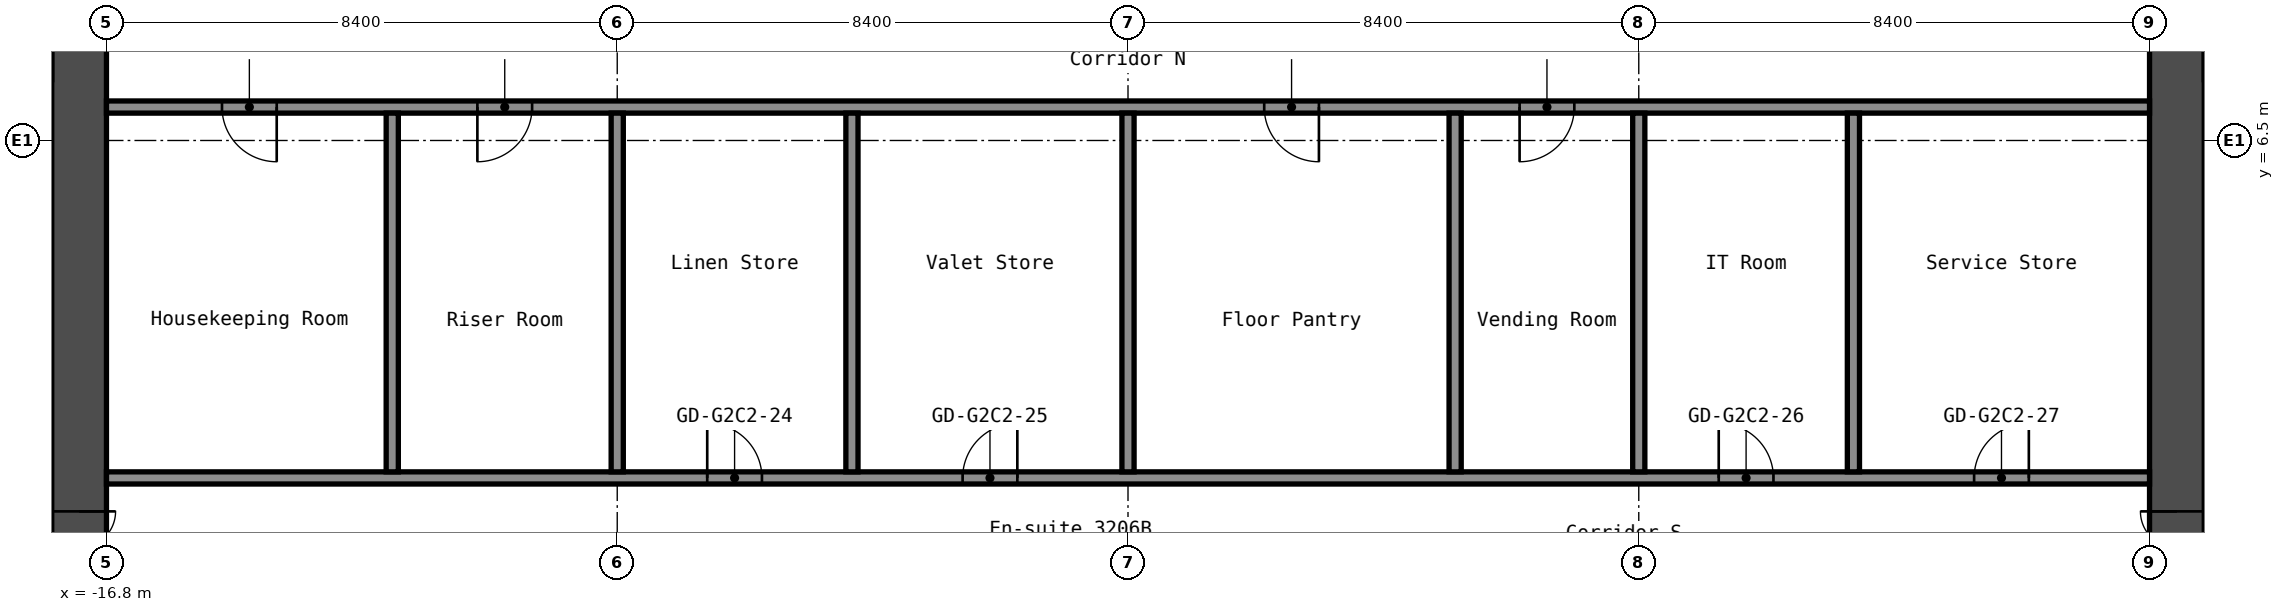
"""IFC4 building model, lengths in metres.
Left out: names, types, materials, properties, quantities, classifications, styles, units other than length and angle.
Written with IfcOpenShell. Run it as: python <this file> out.ifc"""

import sys

from ifc_helpers import new_model, si_unit, direction, frame, frame_2d, origin, place, context, subcontext, project, spatial, rectangle, extrude, element, fill, save


model = new_model("IFC4")
c1 = context("Model", 3, precision=1e-05, world=origin(), true_north=direction((0.0, 1.0)))
c2 = subcontext(c1, "Body", "Model", "MODEL_VIEW")
j1 = project(units=[si_unit("LENGTHUNIT", "METRE"), si_unit("PLANEANGLEUNIT", "RADIAN")], contexts=[c1])
p1 = place(None, origin())
s1 = spatial("IfcSite", under=j1, at=p1, CompositionType="ELEMENT")
p2 = place(p1, origin())
s2 = spatial("IfcBuilding", under=s1, at=p2, CompositionType="ELEMENT")
p3 = place(p2, frame((0.0, 0.0, 113.8)))
s3 = spatial("IfcBuildingStorey", under=s2, at=p3, CompositionType="ELEMENT", Elevation=113.8)
p4 = place(p3, frame((-17.25, -8.4, 0.0), z_axis=(0.0, 0.0, 1.0), x_axis=(0.0, 1.0, 0.0)))
e1 = element("IfcWall", 1, at=p4, inside=s3, PredefinedType="SHEAR", context=c2, shape_type="SweptSolid", body=[
    extrude(rectangle(XDim=16.8, YDim=0.9, at=frame_2d((8.4, 0.0))), origin(), (0.0, 0.0, 1.0), 2.8),
])
p5 = place(p4, frame((7.6, 0.0, 0.0)))
e2 = element("IfcOpeningElement", 2, at=p5, cuts=e1, PredefinedType="OPENING", context=c2, shape_type="SweptSolid", body=[
    extrude(rectangle(XDim=1.2, YDim=2.1, at=frame_2d((0.6, 1.05))), frame((0.0, 0.46, 0.0), z_axis=(0.0, -1.0, 0.0), x_axis=(1.0, 0.0, 0.0)), (0.0, 0.0, 1.0), 0.92),
])
p6 = place(p3, frame((17.25, -8.4, 0.0), z_axis=(0.0, 0.0, 1.0), x_axis=(0.0, 1.0, 0.0)))
e3 = element("IfcWall", 3, at=p6, inside=s3, PredefinedType="SHEAR", context=c2, shape_type="SweptSolid", body=[
    extrude(rectangle(XDim=16.8, YDim=0.9, at=frame_2d((8.4, 0.0))), origin(), (0.0, 0.0, 1.0), 2.8),
])
p7 = place(p6, frame((7.6, 0.0, 0.0)))
e4 = element("IfcOpeningElement", 4, at=p7, cuts=e3, PredefinedType="OPENING", context=c2, shape_type="SweptSolid", body=[
    extrude(rectangle(XDim=1.2, YDim=2.1, at=frame_2d((0.6, 1.05))), frame((0.0, 0.46, 0.0), z_axis=(0.0, -1.0, 0.0), x_axis=(1.0, 0.0, 0.0)), (0.0, 0.0, 1.0), 0.92),
])
p8 = place(p3, frame((-16.8, 0.95, 0.0), z_axis=(0.0, 0.0, 1.0), x_axis=(1.0, 0.0, 0.0)))
e5 = element("IfcWall", 5, at=p8, inside=s3, PredefinedType="PARTITIONING", context=c2, shape_type="SweptSolid", body=[
    extrude(rectangle(XDim=33.6, YDim=0.2, at=frame_2d((16.8, 0.0))), origin(), (0.0, 0.0, 1.0), 2.8),
])
p9 = place(p8, frame((9.88, 0.0, 0.0)))
e6 = element("IfcOpeningElement", 6, at=p9, cuts=e5, PredefinedType="OPENING", context=c2, shape_type="SweptSolid", body=[
    extrude(rectangle(XDim=0.9, YDim=2.1, at=frame_2d((0.45, 1.05))), frame((0.0, 0.11, 0.0), z_axis=(0.0, -1.0, 0.0), x_axis=(1.0, 0.0, 0.0)), (0.0, 0.0, 1.0), 0.22),
])
p10 = place(p8, frame((14.08, 0.0, 0.0)))
e7 = element("IfcOpeningElement", 7, at=p10, cuts=e5, PredefinedType="OPENING", context=c2, shape_type="SweptSolid", body=[
    extrude(rectangle(XDim=0.9, YDim=2.1, at=frame_2d((0.45, 1.05))), frame((0.0, 0.11, 0.0), z_axis=(0.0, -1.0, 0.0), x_axis=(1.0, 0.0, 0.0)), (0.0, 0.0, 1.0), 0.22),
])
p11 = place(p8, frame((26.515, 0.0, 0.0)))
e8 = element("IfcOpeningElement", 8, at=p11, cuts=e5, PredefinedType="OPENING", context=c2, shape_type="SweptSolid", body=[
    extrude(rectangle(XDim=0.9, YDim=2.1, at=frame_2d((0.45, 1.05))), frame((0.0, 0.11, 0.0), z_axis=(0.0, -1.0, 0.0), x_axis=(1.0, 0.0, 0.0)), (0.0, 0.0, 1.0), 0.22),
])
p12 = place(p8, frame((30.715, 0.0, 0.0)))
e9 = element("IfcOpeningElement", 9, at=p12, cuts=e5, PredefinedType="OPENING", context=c2, shape_type="SweptSolid", body=[
    extrude(rectangle(XDim=0.9, YDim=2.1, at=frame_2d((0.45, 1.05))), frame((0.0, 0.11, 0.0), z_axis=(0.0, -1.0, 0.0), x_axis=(1.0, 0.0, 0.0)), (0.0, 0.0, 1.0), 0.22),
])
p13 = place(p3, frame((-16.8, 7.05, 0.0), z_axis=(0.0, 0.0, 1.0), x_axis=(1.0, 0.0, 0.0)))
e10 = element("IfcWall", 10, at=p13, inside=s3, PredefinedType="PARTITIONING", context=c2, shape_type="SweptSolid", body=[
    extrude(rectangle(XDim=33.6, YDim=0.2, at=frame_2d((16.8, 0.0))), origin(), (0.0, 0.0, 1.0), 2.8),
])
p14 = place(p13, frame((1.9, 0.0, 0.0)))
e11 = element("IfcOpeningElement", 11, at=p14, cuts=e10, PredefinedType="OPENING", context=c2, shape_type="SweptSolid", body=[
    extrude(rectangle(XDim=0.9, YDim=2.1, at=frame_2d((0.45, 1.05))), frame((0.0, 0.11, 0.0), z_axis=(0.0, -1.0, 0.0), x_axis=(1.0, 0.0, 0.0)), (0.0, 0.0, 1.0), 0.22),
])
p15 = place(p13, frame((6.1, 0.0, 0.0)))
e12 = element("IfcOpeningElement", 12, at=p15, cuts=e10, PredefinedType="OPENING", context=c2, shape_type="SweptSolid", body=[
    extrude(rectangle(XDim=0.9, YDim=2.1, at=frame_2d((0.45, 1.05))), frame((0.0, 0.11, 0.0), z_axis=(0.0, -1.0, 0.0), x_axis=(1.0, 0.0, 0.0)), (0.0, 0.0, 1.0), 0.22),
])
p16 = place(p13, frame((19.04, 0.0, 0.0)))
e13 = element("IfcOpeningElement", 13, at=p16, cuts=e10, PredefinedType="OPENING", context=c2, shape_type="SweptSolid", body=[
    extrude(rectangle(XDim=0.9, YDim=2.1, at=frame_2d((0.45, 1.05))), frame((0.0, 0.11, 0.0), z_axis=(0.0, -1.0, 0.0), x_axis=(1.0, 0.0, 0.0)), (0.0, 0.0, 1.0), 0.22),
])
p17 = place(p13, frame((23.24, 0.0, 0.0)))
e14 = element("IfcOpeningElement", 14, at=p17, cuts=e10, PredefinedType="OPENING", context=c2, shape_type="SweptSolid", body=[
    extrude(rectangle(XDim=0.9, YDim=2.1, at=frame_2d((0.45, 1.05))), frame((0.0, 0.11, 0.0), z_axis=(0.0, -1.0, 0.0), x_axis=(1.0, 0.0, 0.0)), (0.0, 0.0, 1.0), 0.22),
])
for number, where, z_axis, x_axis in (
    (15, (-12.1, 1.05, 0.0), (0.0, 0.0, 1.0), (0.0, 1.0, 0.0)),
    (16, (-8.4, 1.05, 0.0), (0.0, 0.0, 1.0), (0.0, 1.0, 0.0)),
    (17, (-4.54, 1.05, 0.0), (0.0, 0.0, 1.0), (0.0, 1.0, 0.0)),
    (18, (0.0, 1.05, 0.0), (0.0, 0.0, 1.0), (0.0, 1.0, 0.0)),
    (19, (5.38, 1.05, 0.0), (0.0, 0.0, 1.0), (0.0, 1.0, 0.0)),
    (20, (8.4, 1.05, 0.0), (0.0, 0.0, 1.0), (0.0, 1.0, 0.0)),
    (21, (11.93, 1.05, 0.0), (0.0, 0.0, 1.0), (0.0, 1.0, 0.0)),
):
    element("IfcWall", number, at=place(p3, frame(where, z_axis=z_axis, x_axis=x_axis)), inside=s3, PredefinedType="PARTITIONING", context=c2, shape_type="SweptSolid", body=[
        extrude(rectangle(XDim=5.9, YDim=0.2, at=frame_2d((2.95, 0.0))), origin(), (0.0, 0.0, 1.0), 2.8),
    ])
p18 = place(p5, origin())
e22 = element("IfcDoor", 22, at=p18, inside=s3, OperationType="DOUBLE_DOOR_SINGLE_SWING", PredefinedType="DOOR", context=c2, shape_type="SweptSolid", body=[
    extrude(rectangle(XDim=1.2, YDim=2.1, at=frame_2d((0.6, 1.05))), frame((0.0, 0.025, 0.0), z_axis=(0.0, -1.0, 0.0), x_axis=(1.0, 0.0, 0.0)), (0.0, 0.0, 1.0), 0.05),
])
fill(e2, e22)
p19 = place(p7, origin())
e23 = element("IfcDoor", 23, at=p19, inside=s3, OperationType="DOUBLE_DOOR_SINGLE_SWING", PredefinedType="DOOR", context=c2, shape_type="SweptSolid", body=[
    extrude(rectangle(XDim=1.2, YDim=2.1, at=frame_2d((0.6, 1.05))), frame((0.0, 0.025, 0.0), z_axis=(0.0, -1.0, 0.0), x_axis=(1.0, 0.0, 0.0)), (0.0, 0.0, 1.0), 0.05),
])
fill(e4, e23)
p20 = place(p9, origin())
e24 = element("IfcDoor", 24, at=p20, inside=s3, OperationType="SINGLE_SWING_RIGHT", PredefinedType="DOOR", context=c2, shape_type="SweptSolid", body=[
    extrude(rectangle(XDim=0.9, YDim=2.1, at=frame_2d((0.45, 1.05))), frame((0.0, 0.025, 0.0), z_axis=(0.0, -1.0, 0.0), x_axis=(1.0, 0.0, 0.0)), (0.0, 0.0, 1.0), 0.05),
])
fill(e6, e24)
p21 = place(p10, origin())
e25 = element("IfcDoor", 25, at=p21, inside=s3, OperationType="SINGLE_SWING_LEFT", PredefinedType="DOOR", context=c2, shape_type="SweptSolid", body=[
    extrude(rectangle(XDim=0.9, YDim=2.1, at=frame_2d((0.45, 1.05))), frame((0.0, 0.025, 0.0), z_axis=(0.0, -1.0, 0.0), x_axis=(1.0, 0.0, 0.0)), (0.0, 0.0, 1.0), 0.05),
])
fill(e7, e25)
p22 = place(p11, origin())
e26 = element("IfcDoor", 26, at=p22, inside=s3, OperationType="SINGLE_SWING_RIGHT", PredefinedType="DOOR", context=c2, shape_type="SweptSolid", body=[
    extrude(rectangle(XDim=0.9, YDim=2.1, at=frame_2d((0.45, 1.05))), frame((0.0, 0.025, 0.0), z_axis=(0.0, -1.0, 0.0), x_axis=(1.0, 0.0, 0.0)), (0.0, 0.0, 1.0), 0.05),
])
fill(e8, e26)
p23 = place(p12, origin())
e27 = element("IfcDoor", 27, at=p23, inside=s3, OperationType="SINGLE_SWING_LEFT", PredefinedType="DOOR", context=c2, shape_type="SweptSolid", body=[
    extrude(rectangle(XDim=0.9, YDim=2.1, at=frame_2d((0.45, 1.05))), frame((0.0, 0.025, 0.0), z_axis=(0.0, -1.0, 0.0), x_axis=(1.0, 0.0, 0.0)), (0.0, 0.0, 1.0), 0.05),
])
fill(e9, e27)
p24 = place(p14, origin())
e28 = element("IfcDoor", 28, at=p24, inside=s3, OperationType="SINGLE_SWING_RIGHT", PredefinedType="DOOR", context=c2, shape_type="SweptSolid", body=[
    extrude(rectangle(XDim=0.9, YDim=2.1, at=frame_2d((0.45, 1.05))), frame((0.0, 0.025, 0.0), z_axis=(0.0, -1.0, 0.0), x_axis=(1.0, 0.0, 0.0)), (0.0, 0.0, 1.0), 0.05),
])
fill(e11, e28)
p25 = place(p15, origin())
e29 = element("IfcDoor", 29, at=p25, inside=s3, OperationType="SINGLE_SWING_LEFT", PredefinedType="DOOR", context=c2, shape_type="SweptSolid", body=[
    extrude(rectangle(XDim=0.9, YDim=2.1, at=frame_2d((0.45, 1.05))), frame((0.0, 0.025, 0.0), z_axis=(0.0, -1.0, 0.0), x_axis=(1.0, 0.0, 0.0)), (0.0, 0.0, 1.0), 0.05),
])
fill(e12, e29)
p26 = place(p16, origin())
e30 = element("IfcDoor", 30, at=p26, inside=s3, OperationType="SINGLE_SWING_RIGHT", PredefinedType="DOOR", context=c2, shape_type="SweptSolid", body=[
    extrude(rectangle(XDim=0.9, YDim=2.1, at=frame_2d((0.45, 1.05))), frame((0.0, 0.025, 0.0), z_axis=(0.0, -1.0, 0.0), x_axis=(1.0, 0.0, 0.0)), (0.0, 0.0, 1.0), 0.05),
])
fill(e13, e30)
p27 = place(p17, origin())
e31 = element("IfcDoor", 31, at=p27, inside=s3, OperationType="SINGLE_SWING_LEFT", PredefinedType="DOOR", context=c2, shape_type="SweptSolid", body=[
    extrude(rectangle(XDim=0.9, YDim=2.1, at=frame_2d((0.45, 1.05))), frame((0.0, 0.025, 0.0), z_axis=(0.0, -1.0, 0.0), x_axis=(1.0, 0.0, 0.0)), (0.0, 0.0, 1.0), 0.05),
])
fill(e14, e31)
save(model, sys.argv[1])
